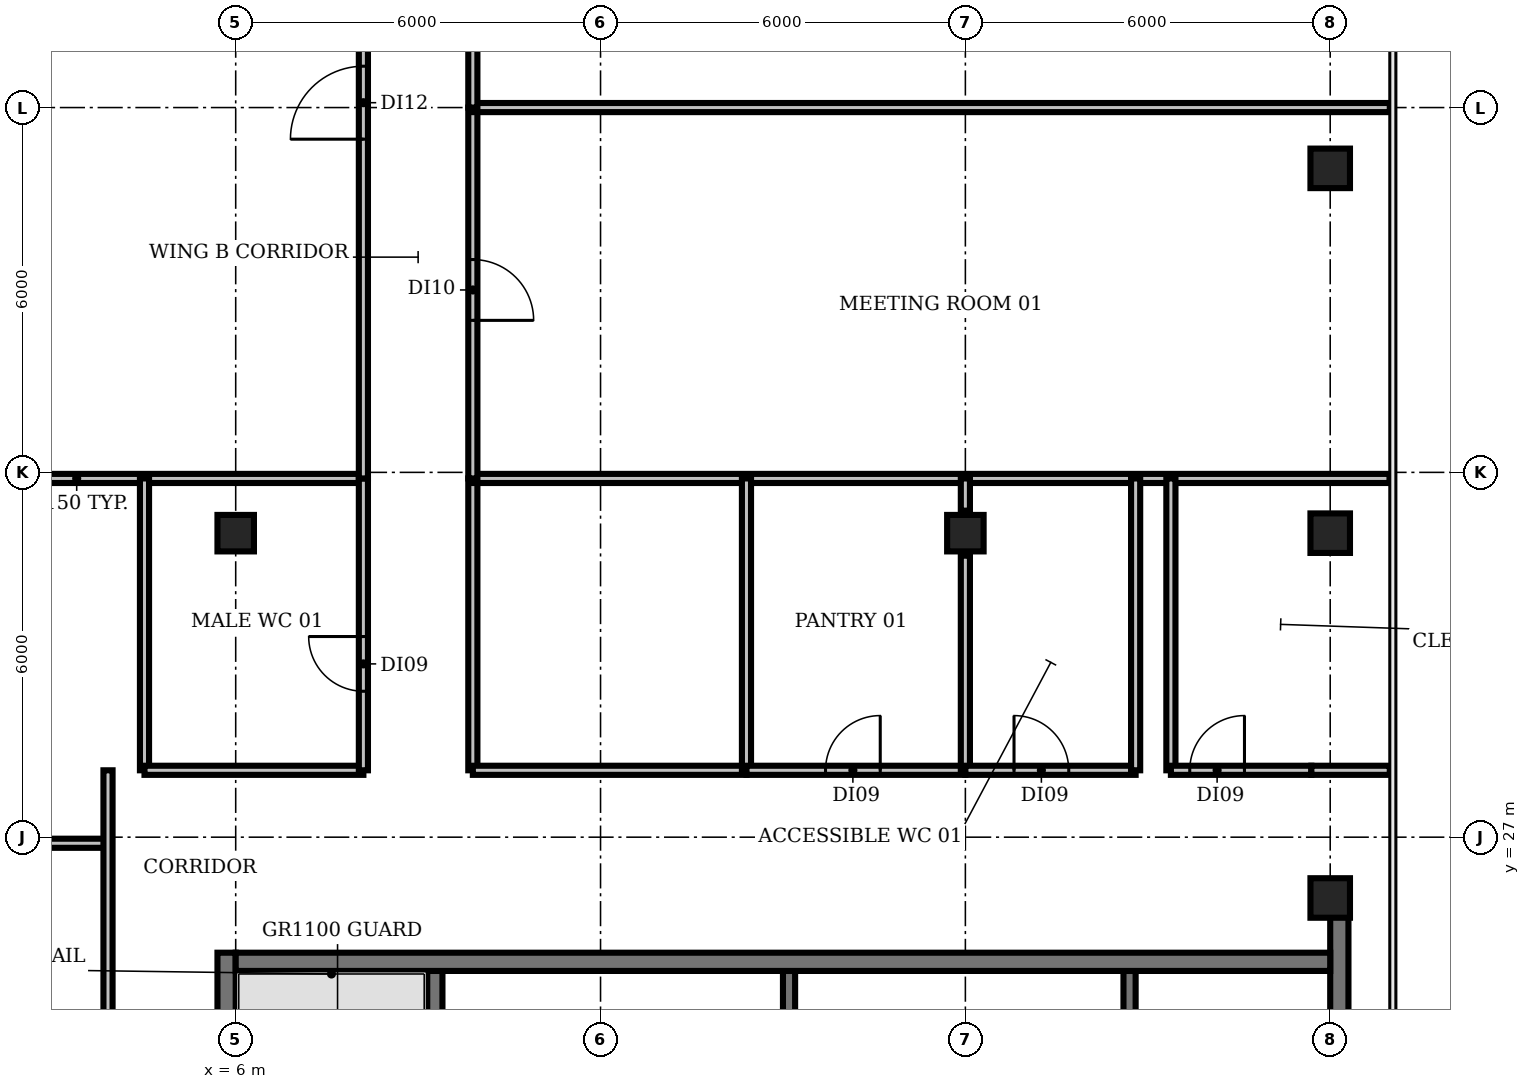
"""IFC4 building model, lengths in metres.
Left out: names, types, materials, properties, quantities, classifications, styles, units other than length and angle.
Written with IfcOpenShell. Run it as: python <this file> out.ifc"""

import sys

from ifc_helpers import new_model, si_unit, direction, frame, frame_2d, origin, origin_2d, place, context, subcontext, project, spatial, rectangle, extrude, element, fill, save


model = new_model("IFC4")
c1 = context("Model", 3, precision=1e-05, world=origin(), true_north=direction((0.0, 1.0)))
c2 = subcontext(c1, "Body", "Model", "MODEL_VIEW")
j1 = project(units=[si_unit("LENGTHUNIT", "METRE"), si_unit("PLANEANGLEUNIT", "RADIAN")], contexts=[c1])
p1 = place(None, origin())
s1 = spatial("IfcSite", under=j1, at=p1, CompositionType="ELEMENT")
p2 = place(p1, origin())
s2 = spatial("IfcBuilding", under=s1, at=p2, CompositionType="ELEMENT")
p3 = place(p2, frame((0.0, 0.0, 327.2)))
s3 = spatial("IfcBuildingStorey", under=s2, at=p3, CompositionType="ELEMENT", Elevation=327.2)
for number, where, z_axis, x_axis in (
    (1, (6.0, 32.0, 0.0), (0.0, 0.0, 1.0), (1.0, 0.0, 0.0)),
    (2, (18.0, 32.0, 0.0), (0.0, 0.0, 1.0), (1.0, 0.0, 0.0)),
):
    element("IfcColumn", number, at=place(p3, frame(where, z_axis=z_axis, x_axis=x_axis)), inside=s3, PredefinedType="COLUMN", context=c2, shape_type="SweptSolid", body=[
        extrude(rectangle(XDim=0.6, YDim=0.6, at=origin_2d()), origin(), (0.0, 0.0, 1.0), 3.9),
    ])
for number, where, z_axis, x_axis in (
    (3, (24.0, 26.0, 0.0), (0.0, 0.0, 1.0), (1.0, 0.0, 0.0)),
    (4, (24.0, 32.0, 0.0), (0.0, 0.0, 1.0), (1.0, 0.0, 0.0)),
    (5, (24.0, 38.0, 0.0), (0.0, 0.0, 1.0), (1.0, 0.0, 0.0)),
):
    element("IfcColumn", number, at=place(p3, frame(where, z_axis=z_axis, x_axis=x_axis)), inside=s3, PredefinedType="COLUMN", context=c2, shape_type="SweptSolid", body=[
        extrude(rectangle(XDim=0.65, YDim=0.65, at=origin_2d()), origin(), (0.0, 0.0, 1.0), 3.9),
    ])
p4 = place(p3, frame((9.275, 18.375, 0.0), z_axis=(0.0, 0.0, 1.0), x_axis=(0.0, 1.0, 0.0)))
e6 = element("IfcWall", 6, at=p4, inside=s3, PredefinedType="SHEAR", context=c2, shape_type="SweptSolid", body=[
    extrude(rectangle(XDim=6.425, YDim=0.25, at=frame_2d((3.212, 0.0))), origin(), (0.0, 0.0, 1.0), 3.9),
])
for number, where, z_axis, x_axis in (
    (7, (15.1, 22.9, 0.0), (0.0, 0.0, 1.0), (0.0, 1.0, 0.0)),
    (8, (20.7, 22.9, 0.0), (0.0, 0.0, 1.0), (0.0, 1.0, 0.0)),
):
    element("IfcWall", number, at=place(p3, frame(where, z_axis=z_axis, x_axis=x_axis)), inside=s3, PredefinedType="SHEAR", context=c2, shape_type="SweptSolid", body=[
        extrude(rectangle(XDim=1.9, YDim=0.2, at=frame_2d((0.95, 0.0))), origin(), (0.0, 0.0, 1.0), 3.9),
    ])
p5 = place(p3, frame((5.85, 5.1, 0.0), z_axis=(0.0, 0.0, 1.0), x_axis=(0.0, 1.0, 0.0)))
e9 = element("IfcWall", 9, at=p5, inside=s3, PredefinedType="SHEAR", context=c2, shape_type="SweptSolid", body=[
    extrude(rectangle(XDim=20.0, YDim=0.3, at=frame_2d((10.0, 0.0))), origin(), (0.0, 0.0, 1.0), 3.9),
])
p6 = place(p5, frame((0.55, 0.0, 0.0)))
e10 = element("IfcOpeningElement", 10, at=p6, cuts=e9, PredefinedType="OPENING", context=c2, shape_type="SweptSolid", body=[
    extrude(rectangle(XDim=1.5, YDim=2.1, at=frame_2d((0.75, 1.05))), frame((0.0, 0.16, 0.0), z_axis=(0.0, -1.0, 0.0), x_axis=(1.0, 0.0, 0.0)), (0.0, 0.0, 1.0), 0.32),
])
p7 = place(p5, frame((7.0, 0.0, 0.0)))
e11 = element("IfcOpeningElement", 11, at=p7, cuts=e9, PredefinedType="OPENING", context=c2, shape_type="SweptSolid", body=[
    extrude(rectangle(XDim=1.2, YDim=2.1, at=frame_2d((0.6, 1.05))), frame((0.0, 0.16, 0.0), z_axis=(0.0, -1.0, 0.0), x_axis=(1.0, 0.0, 0.0)), (0.0, 0.0, 1.0), 0.32),
])
p8 = place(p5, frame((13.55, 0.0, 0.0)))
e12 = element("IfcOpeningElement", 12, at=p8, cuts=e9, PredefinedType="OPENING", context=c2, shape_type="SweptSolid", body=[
    extrude(rectangle(XDim=1.2, YDim=2.1, at=frame_2d((0.6, 1.05))), frame((0.0, 0.16, 0.0), z_axis=(0.0, -1.0, 0.0), x_axis=(1.0, 0.0, 0.0)), (0.0, 0.0, 1.0), 0.32),
])
p9 = place(p3, frame((24.15, 25.705, 0.0), z_axis=(0.0, 0.0, 1.0), x_axis=(0.0, -1.0, 0.0)))
e13 = element("IfcWall", 13, at=p9, inside=s3, PredefinedType="SHEAR", context=c2, shape_type="SweptSolid", body=[
    extrude(rectangle(XDim=20.605, YDim=0.3, at=frame_2d((10.302, 0.0))), origin(), (0.0, 0.0, 1.0), 3.9),
])
p10 = place(p9, frame((18.555, 0.0, 0.0)))
e14 = element("IfcOpeningElement", 14, at=p10, cuts=e13, PredefinedType="OPENING", context=c2, shape_type="SweptSolid", body=[
    extrude(rectangle(XDim=1.5, YDim=2.1, at=frame_2d((0.75, 1.05))), frame((0.0, 0.16, 0.0), z_axis=(0.0, -1.0, 0.0), x_axis=(1.0, 0.0, 0.0)), (0.0, 0.0, 1.0), 0.32),
])
p11 = place(p9, frame((12.455, 0.0, 0.0)))
e15 = element("IfcOpeningElement", 15, at=p11, cuts=e13, PredefinedType="OPENING", context=c2, shape_type="SweptSolid", body=[
    extrude(rectangle(XDim=0.9, YDim=2.1, at=frame_2d((0.45, 1.05))), frame((0.0, 0.16, 0.0), z_axis=(0.0, -1.0, 0.0), x_axis=(1.0, 0.0, 0.0)), (0.0, 0.0, 1.0), 0.32),
])
p12 = place(p9, frame((6.455, 0.0, 0.0)))
e16 = element("IfcOpeningElement", 16, at=p12, cuts=e13, PredefinedType="OPENING", context=c2, shape_type="SweptSolid", body=[
    extrude(rectangle(XDim=2.0, YDim=2.1, at=frame_2d((1.0, 1.05))), frame((0.0, 0.16, 0.0), z_axis=(0.0, -1.0, 0.0), x_axis=(1.0, 0.0, 0.0)), (0.0, 0.0, 1.0), 0.32),
])
p13 = place(p3, frame((6.0, 24.95, 0.0), z_axis=(0.0, 0.0, 1.0), x_axis=(1.0, 0.0, 0.0)))
e17 = element("IfcWall", 17, at=p13, inside=s3, PredefinedType="SHEAR", context=c2, shape_type="SweptSolid", body=[
    extrude(rectangle(XDim=18.0, YDim=0.3, at=frame_2d((9.0, 0.0))), origin(), (0.0, 0.0, 1.0), 3.9),
])
p14 = place(p3, frame((-1.33, 32.9, 0.0), z_axis=(0.0, 0.0, 1.0), x_axis=(1.0, 0.0, 0.0)))
e18 = element("IfcWall", 18, at=p14, inside=s3, PredefinedType="PARTITIONING", context=c2, shape_type="SweptSolid", body=[
    extrude(rectangle(XDim=9.43, YDim=0.15, at=frame_2d((4.715, 0.0))), origin(), (0.0, 0.0, 1.0), 2.95),
])
p15 = place(p3, frame((-1.17, 26.9, 0.0), z_axis=(0.0, 0.0, 1.0), x_axis=(1.0, 0.0, 0.0)))
e19 = element("IfcWall", 19, at=p15, inside=s3, PredefinedType="PARTITIONING", context=c2, shape_type="SweptSolid", body=[
    extrude(rectangle(XDim=5.07, YDim=0.15, at=frame_2d((2.535, 0.0))), origin(), (0.0, 0.0, 1.0), 2.95),
])
p16 = place(p3, frame((3.9, 22.5, 0.0), z_axis=(0.0, 0.0, 1.0), x_axis=(0.0, 1.0, 0.0)))
e20 = element("IfcWall", 20, at=p16, inside=s3, PredefinedType="PARTITIONING", context=c2, shape_type="SweptSolid", body=[
    extrude(rectangle(XDim=5.6, YDim=0.15, at=frame_2d((2.8, 0.0))), origin(), (0.0, 0.0, 1.0), 2.95),
])
p17 = place(p3, frame((4.5, 28.1, 0.0), z_axis=(0.0, 0.0, 1.0), x_axis=(0.0, 1.0, 0.0)))
e21 = element("IfcWall", 21, at=p17, inside=s3, PredefinedType="PARTITIONING", context=c2, shape_type="SweptSolid", body=[
    extrude(rectangle(XDim=4.8, YDim=0.15, at=frame_2d((2.4, 0.0))), origin(), (0.0, 0.0, 1.0), 2.95),
])
p18 = place(p3, frame((4.5, 28.1, 0.0), z_axis=(0.0, 0.0, 1.0), x_axis=(1.0, 0.0, 0.0)))
e22 = element("IfcWall", 22, at=p18, inside=s3, PredefinedType="PARTITIONING", context=c2, shape_type="SweptSolid", body=[
    extrude(rectangle(XDim=3.6, YDim=0.15, at=frame_2d((1.8, 0.0))), origin(), (0.0, 0.0, 1.0), 2.95),
])
p19 = place(p3, frame((8.1, 28.1, 0.0), z_axis=(0.0, 0.0, 1.0), x_axis=(0.0, 1.0, 0.0)))
e23 = element("IfcWall", 23, at=p19, inside=s3, PredefinedType="PARTITIONING", context=c2, shape_type="SweptSolid", body=[
    extrude(rectangle(XDim=4.8, YDim=0.15, at=frame_2d((2.4, 0.0))), origin(), (0.0, 0.0, 1.0), 2.95),
])
p20 = place(p19, frame((1.3, 0.0, 0.0)))
e24 = element("IfcOpeningElement", 24, at=p20, cuts=e23, PredefinedType="OPENING", context=c2, shape_type="SweptSolid", body=[
    extrude(rectangle(XDim=0.9, YDim=2.1, at=frame_2d((0.45, 1.05))), frame((0.0, 0.085, 0.0), z_axis=(0.0, -1.0, 0.0), x_axis=(1.0, 0.0, 0.0)), (0.0, 0.0, 1.0), 0.17),
])
p21 = place(p3, frame((8.1, 32.9, 0.0), z_axis=(0.0, 0.0, 1.0), x_axis=(0.0, 1.0, 0.0)))
e25 = element("IfcWall", 25, at=p21, inside=s3, PredefinedType="PARTITIONING", context=c2, shape_type="SweptSolid", body=[
    extrude(rectangle(XDim=12.08, YDim=0.15, at=frame_2d((6.04, 0.0))), origin(), (0.0, 0.0, 1.0), 2.95),
])
p22 = place(p21, frame((5.58, 0.0, 0.0)))
e26 = element("IfcOpeningElement", 26, at=p22, cuts=e25, PredefinedType="OPENING", context=c2, shape_type="SweptSolid", body=[
    extrude(rectangle(XDim=1.2, YDim=2.1, at=frame_2d((0.6, 1.05))), frame((0.0, 0.085, 0.0), z_axis=(0.0, -1.0, 0.0), x_axis=(1.0, 0.0, 0.0)), (0.0, 0.0, 1.0), 0.17),
])
p23 = place(p3, frame((9.9, 28.1, 0.0), z_axis=(0.0, 0.0, 1.0), x_axis=(0.0, 1.0, 0.0)))
e27 = element("IfcWall", 27, at=p23, inside=s3, PredefinedType="PARTITIONING", context=c2, shape_type="SweptSolid", body=[
    extrude(rectangle(XDim=4.8, YDim=0.15, at=frame_2d((2.4, 0.0))), origin(), (0.0, 0.0, 1.0), 2.95),
])
p24 = place(p3, frame((9.9, 28.1, 0.0), z_axis=(0.0, 0.0, 1.0), x_axis=(1.0, 0.0, 0.0)))
e28 = element("IfcWall", 28, at=p24, inside=s3, PredefinedType="PARTITIONING", context=c2, shape_type="SweptSolid", body=[
    extrude(rectangle(XDim=4.5, YDim=0.15, at=frame_2d((2.25, 0.0))), origin(), (0.0, 0.0, 1.0), 2.95),
])
p25 = place(p3, frame((9.9, 32.9, 0.0), z_axis=(0.0, 0.0, 1.0), x_axis=(1.0, 0.0, 0.0)))
e29 = element("IfcWall", 29, at=p25, inside=s3, PredefinedType="PARTITIONING", context=c2, shape_type="SweptSolid", body=[
    extrude(rectangle(XDim=15.075, YDim=0.15, at=frame_2d((7.538, 0.0))), origin(), (0.0, 0.0, 1.0), 2.95),
])
p26 = place(p3, frame((9.9, 39.0, 0.0), z_axis=(0.0, 0.0, 1.0), x_axis=(0.0, -1.0, 0.0)))
e30 = element("IfcWall", 30, at=p26, inside=s3, PredefinedType="PARTITIONING", context=c2, shape_type="SweptSolid", body=[
    extrude(rectangle(XDim=6.1, YDim=0.15, at=frame_2d((3.05, 0.0))), origin(), (0.0, 0.0, 1.0), 2.95),
])
p27 = place(p26, frame((2.5, 0.0, 0.0)))
e31 = element("IfcOpeningElement", 31, at=p27, cuts=e30, PredefinedType="OPENING", context=c2, shape_type="SweptSolid", body=[
    extrude(rectangle(XDim=1.0, YDim=2.1, at=frame_2d((0.5, 1.05))), frame((0.0, 0.085, 0.0), z_axis=(0.0, -1.0, 0.0), x_axis=(1.0, 0.0, 0.0)), (0.0, 0.0, 1.0), 0.17),
])
p28 = place(p3, frame((9.9, 39.0, 0.0), z_axis=(0.0, 0.0, 1.0), x_axis=(1.0, 0.0, 0.0)))
e32 = element("IfcWall", 32, at=p28, inside=s3, PredefinedType="PARTITIONING", context=c2, shape_type="SweptSolid", body=[
    extrude(rectangle(XDim=15.08, YDim=0.15, at=frame_2d((7.54, 0.0))), origin(), (0.0, 0.0, 1.0), 2.95),
])
p29 = place(p3, frame((9.9, 43.9, 0.0), z_axis=(0.0, 0.0, 1.0), x_axis=(0.0, -1.0, 0.0)))
e33 = element("IfcWall", 33, at=p29, inside=s3, PredefinedType="PARTITIONING", context=c2, shape_type="SweptSolid", body=[
    extrude(rectangle(XDim=4.9, YDim=0.15, at=frame_2d((2.45, 0.0))), origin(), (0.0, 0.0, 1.0), 2.95),
])
p30 = place(p29, frame((1.6, 0.0, 0.0)))
e34 = element("IfcOpeningElement", 34, at=p30, cuts=e33, PredefinedType="OPENING", context=c2, shape_type="SweptSolid", body=[
    extrude(rectangle(XDim=1.0, YDim=2.1, at=frame_2d((0.5, 1.05))), frame((0.0, 0.085, 0.0), z_axis=(0.0, -1.0, 0.0), x_axis=(1.0, 0.0, 0.0)), (0.0, 0.0, 1.0), 0.17),
])
p31 = place(p3, frame((14.4, 28.1, 0.0), z_axis=(0.0, 0.0, 1.0), x_axis=(0.0, 1.0, 0.0)))
e35 = element("IfcWall", 35, at=p31, inside=s3, PredefinedType="PARTITIONING", context=c2, shape_type="SweptSolid", body=[
    extrude(rectangle(XDim=4.8, YDim=0.15, at=frame_2d((2.4, 0.0))), origin(), (0.0, 0.0, 1.0), 2.95),
])
p32 = place(p3, frame((14.4, 28.1, 0.0), z_axis=(0.0, 0.0, 1.0), x_axis=(1.0, 0.0, 0.0)))
e36 = element("IfcWall", 36, at=p32, inside=s3, PredefinedType="PARTITIONING", context=c2, shape_type="SweptSolid", body=[
    extrude(rectangle(XDim=3.6, YDim=0.15, at=frame_2d((1.8, 0.0))), origin(), (0.0, 0.0, 1.0), 2.95),
])
p33 = place(p32, frame((1.3, 0.0, 0.0)))
e37 = element("IfcOpeningElement", 37, at=p33, cuts=e36, PredefinedType="OPENING", context=c2, shape_type="SweptSolid", body=[
    extrude(rectangle(XDim=0.9, YDim=2.1, at=frame_2d((0.45, 1.05))), frame((0.0, 0.085, 0.0), z_axis=(0.0, -1.0, 0.0), x_axis=(1.0, 0.0, 0.0)), (0.0, 0.0, 1.0), 0.17),
])
p34 = place(p3, frame((18.0, 28.1, 0.0), z_axis=(0.0, 0.0, 1.0), x_axis=(0.0, 1.0, 0.0)))
e38 = element("IfcWall", 38, at=p34, inside=s3, PredefinedType="PARTITIONING", context=c2, shape_type="SweptSolid", body=[
    extrude(rectangle(XDim=3.53, YDim=0.15, at=frame_2d((1.765, 0.0))), origin(), (0.0, 0.0, 1.0), 2.95),
])
p35 = place(p3, frame((18.0, 28.1, 0.0), z_axis=(0.0, 0.0, 1.0), x_axis=(1.0, 0.0, 0.0)))
e39 = element("IfcWall", 39, at=p35, inside=s3, PredefinedType="PARTITIONING", context=c2, shape_type="SweptSolid", body=[
    extrude(rectangle(XDim=2.8, YDim=0.15, at=frame_2d((1.4, 0.0))), origin(), (0.0, 0.0, 1.0), 2.95),
])
p36 = place(p35, frame((0.8, 0.0, 0.0)))
e40 = element("IfcOpeningElement", 40, at=p36, cuts=e39, PredefinedType="OPENING", context=c2, shape_type="SweptSolid", body=[
    extrude(rectangle(XDim=0.9, YDim=2.1, at=frame_2d((0.45, 1.05))), frame((0.0, 0.085, 0.0), z_axis=(0.0, -1.0, 0.0), x_axis=(1.0, 0.0, 0.0)), (0.0, 0.0, 1.0), 0.17),
])
p37 = place(p3, frame((18.0, 31.736, 0.0), z_axis=(0.0, 0.0, 1.0), x_axis=(0.0, 1.0, 0.0)))
e41 = element("IfcWall", 41, at=p37, inside=s3, PredefinedType="PARTITIONING", context=c2, shape_type="SweptSolid", body=[
    extrude(rectangle(XDim=0.529, YDim=0.15, at=frame_2d((0.264, 0.0))), origin(), (0.0, 0.0, 1.0), 2.95),
])
p38 = place(p3, frame((18.0, 32.37, 0.0), z_axis=(0.0, 0.0, 1.0), x_axis=(0.0, 1.0, 0.0)))
e42 = element("IfcWall", 42, at=p38, inside=s3, PredefinedType="PARTITIONING", context=c2, shape_type="SweptSolid", body=[
    extrude(rectangle(XDim=0.53, YDim=0.15, at=frame_2d((0.265, 0.0))), origin(), (0.0, 0.0, 1.0), 2.95),
])
for number, where, z_axis, x_axis in (
    (43, (20.8, 28.1, 0.0), (0.0, 0.0, 1.0), (0.0, 1.0, 0.0)),
    (44, (21.38, 28.1, 0.0), (0.0, 0.0, 1.0), (0.0, 1.0, 0.0)),
):
    element("IfcWall", number, at=place(p3, frame(where, z_axis=z_axis, x_axis=x_axis)), inside=s3, PredefinedType="PARTITIONING", context=c2, shape_type="SweptSolid", body=[
        extrude(rectangle(XDim=4.8, YDim=0.15, at=frame_2d((2.4, 0.0))), origin(), (0.0, 0.0, 1.0), 2.95),
    ])
p39 = place(p3, frame((21.38, 28.1, 0.0), z_axis=(0.0, 0.0, 1.0), x_axis=(1.0, 0.0, 0.0)))
e45 = element("IfcWall", 45, at=p39, inside=s3, PredefinedType="PARTITIONING", context=c2, shape_type="SweptSolid", body=[
    extrude(rectangle(XDim=2.31, YDim=0.15, at=frame_2d((1.155, 0.0))), origin(), (0.0, 0.0, 1.0), 2.95),
])
p40 = place(p39, frame((0.31, 0.0, 0.0)))
e46 = element("IfcOpeningElement", 46, at=p40, cuts=e45, PredefinedType="OPENING", context=c2, shape_type="SweptSolid", body=[
    extrude(rectangle(XDim=0.9, YDim=2.1, at=frame_2d((0.45, 1.05))), frame((0.0, 0.085, 0.0), z_axis=(0.0, -1.0, 0.0), x_axis=(1.0, 0.0, 0.0)), (0.0, 0.0, 1.0), 0.17),
])
p41 = place(p3, frame((23.69, 28.1, 0.0), z_axis=(0.0, 0.0, 1.0), x_axis=(1.0, 0.0, 0.0)))
e47 = element("IfcWall", 47, at=p41, inside=s3, PredefinedType="PARTITIONING", context=c2, shape_type="SweptSolid", body=[
    extrude(rectangle(XDim=1.29, YDim=0.15, at=frame_2d((0.645, 0.0))), origin(), (0.0, 0.0, 1.0), 2.95),
])
p42 = place(p20, origin())
e48 = element("IfcDoor", 48, at=p42, inside=s3, OperationType="SINGLE_SWING_RIGHT", PredefinedType="DOOR", context=c2, shape_type="SweptSolid", body=[
    extrude(rectangle(XDim=0.9, YDim=2.1, at=frame_2d((0.45, 1.05))), frame((0.0, 0.025, 0.0), z_axis=(0.0, -1.0, 0.0), x_axis=(1.0, 0.0, 0.0)), (0.0, 0.0, 1.0), 0.05),
])
fill(e24, e48)
p43 = place(p22, origin())
e49 = element("IfcDoor", 49, at=p43, inside=s3, OperationType="SINGLE_SWING_LEFT", PredefinedType="DOOR", context=c2, shape_type="SweptSolid", body=[
    extrude(rectangle(XDim=1.2, YDim=2.1, at=frame_2d((0.6, 1.05))), frame((0.0, 0.025, 0.0), z_axis=(0.0, -1.0, 0.0), x_axis=(1.0, 0.0, 0.0)), (0.0, 0.0, 1.0), 0.05),
])
fill(e26, e49)
p44 = place(p27, origin())
e50 = element("IfcDoor", 50, at=p44, inside=s3, OperationType="SINGLE_SWING_RIGHT", PredefinedType="DOOR", context=c2, shape_type="SweptSolid", body=[
    extrude(rectangle(XDim=1.0, YDim=2.1, at=frame_2d((0.5, 1.05))), frame((0.0, 0.025, 0.0), z_axis=(0.0, -1.0, 0.0), x_axis=(1.0, 0.0, 0.0)), (0.0, 0.0, 1.0), 0.05),
])
fill(e31, e50)
p45 = place(p33, origin())
e51 = element("IfcDoor", 51, at=p45, inside=s3, OperationType="SINGLE_SWING_RIGHT", PredefinedType="DOOR", context=c2, shape_type="SweptSolid", body=[
    extrude(rectangle(XDim=0.9, YDim=2.1, at=frame_2d((0.45, 1.05))), frame((0.0, 0.025, 0.0), z_axis=(0.0, -1.0, 0.0), x_axis=(1.0, 0.0, 0.0)), (0.0, 0.0, 1.0), 0.05),
])
fill(e37, e51)
p46 = place(p36, origin())
e52 = element("IfcDoor", 52, at=p46, inside=s3, OperationType="SINGLE_SWING_LEFT", PredefinedType="DOOR", context=c2, shape_type="SweptSolid", body=[
    extrude(rectangle(XDim=0.9, YDim=2.1, at=frame_2d((0.45, 1.05))), frame((0.0, 0.025, 0.0), z_axis=(0.0, -1.0, 0.0), x_axis=(1.0, 0.0, 0.0)), (0.0, 0.0, 1.0), 0.05),
])
fill(e40, e52)
p47 = place(p40, origin())
e53 = element("IfcDoor", 53, at=p47, inside=s3, OperationType="SINGLE_SWING_RIGHT", PredefinedType="DOOR", context=c2, shape_type="SweptSolid", body=[
    extrude(rectangle(XDim=0.9, YDim=2.1, at=frame_2d((0.45, 1.05))), frame((0.0, 0.025, 0.0), z_axis=(0.0, -1.0, 0.0), x_axis=(1.0, 0.0, 0.0)), (0.0, 0.0, 1.0), 0.05),
])
fill(e46, e53)
save(model, sys.argv[1])
